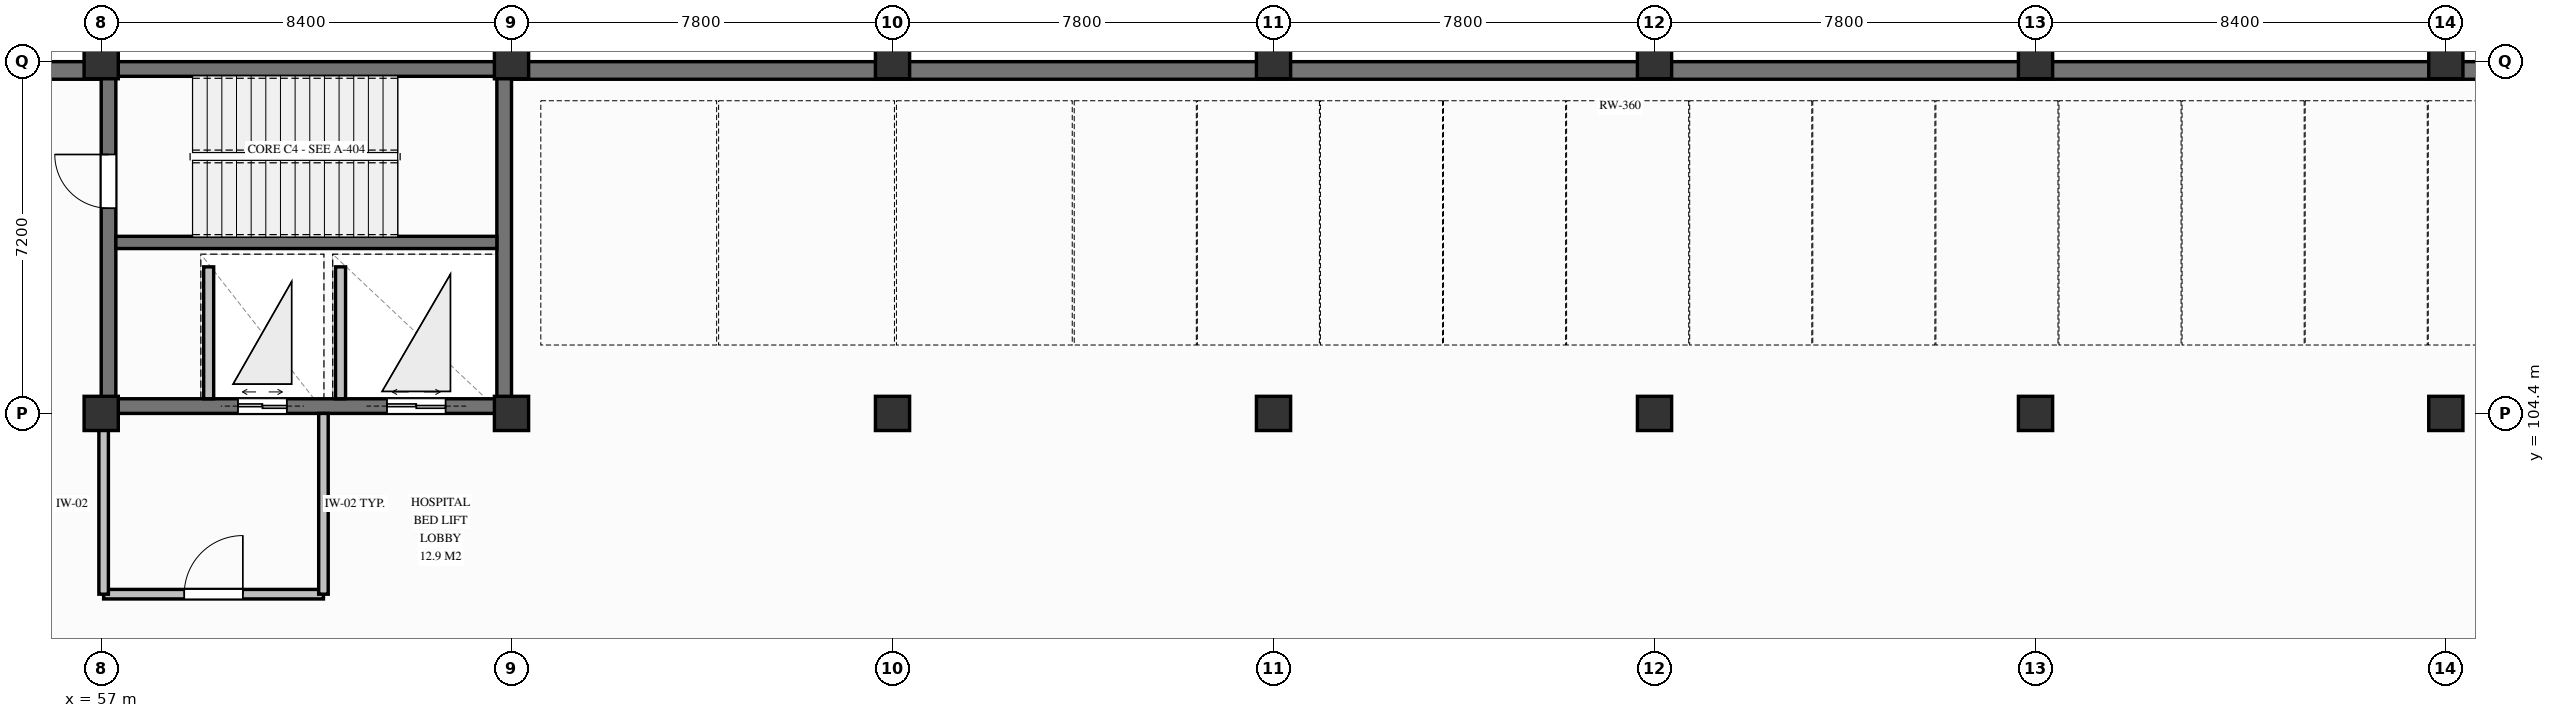
"""IFC4 building model, lengths in metres.
Left out: names, types, materials, properties, quantities, classifications, styles, units other than length and angle.
Written with IfcOpenShell. Run it as: python <this file> out.ifc"""

import sys

from ifc_helpers import new_model, si_unit, direction, frame, frame_2d, origin, origin_2d, place, context, subcontext, project, spatial, rectangle, extrude, element, fill, save


model = new_model("IFC4")
c1 = context("Model", 3, precision=1e-05, world=origin(), true_north=direction((0.0, 1.0)))
c2 = subcontext(c1, "Body", "Model", "MODEL_VIEW")
j1 = project(units=[si_unit("LENGTHUNIT", "METRE"), si_unit("PLANEANGLEUNIT", "RADIAN")], contexts=[c1])
p1 = place(None, origin())
s1 = spatial("IfcSite", under=j1, at=p1, CompositionType="ELEMENT")
p2 = place(p1, origin())
s2 = spatial("IfcBuilding", under=s1, at=p2, CompositionType="ELEMENT")
p3 = place(p2, frame((0.0, 0.0, -4.5)))
s3 = spatial("IfcBuildingStorey", under=s2, at=p3, CompositionType="ELEMENT", Elevation=-4.5)
p4 = place(p3, frame((57.0, 111.45, 0.0), z_axis=(0.0, 0.0, 1.0), x_axis=(1.0, 0.0, 0.0)))
e1 = element("IfcWall", 1, at=p4, inside=s3, PredefinedType="SHEAR", context=c2, shape_type="SweptSolid", body=[
    extrude(rectangle(XDim=8.4, YDim=0.3, at=frame_2d((4.2, 0.0))), origin(), (0.0, 0.0, 1.0), 4.5),
])
p5 = place(p3, frame((57.0, 104.55, 0.0), z_axis=(0.0, 0.0, 1.0), x_axis=(1.0, 0.0, 0.0)))
e2 = element("IfcWall", 2, at=p5, inside=s3, PredefinedType="SHEAR", context=c2, shape_type="SweptSolid", body=[
    extrude(rectangle(XDim=8.4, YDim=0.3, at=frame_2d((4.2, 0.0))), origin(), (0.0, 0.0, 1.0), 4.5),
])
p6 = place(p5, frame((2.8, 0.0, 0.0)))
e3 = element("IfcOpeningElement", 3, at=p6, cuts=e2, PredefinedType="OPENING", context=c2, shape_type="SweptSolid", body=[
    extrude(rectangle(XDim=1.0, YDim=2.1, at=frame_2d((0.5, 1.05))), frame((0.0, 0.16, 0.0), z_axis=(0.0, -1.0, 0.0), x_axis=(1.0, 0.0, 0.0)), (0.0, 0.0, 1.0), 0.32),
])
p7 = place(p5, frame((5.85, 0.0, 0.0)))
e4 = element("IfcOpeningElement", 4, at=p7, cuts=e2, PredefinedType="OPENING", context=c2, shape_type="SweptSolid", body=[
    extrude(rectangle(XDim=1.2, YDim=2.15, at=frame_2d((0.6, 1.075))), frame((0.0, 0.16, 0.0), z_axis=(0.0, -1.0, 0.0), x_axis=(1.0, 0.0, 0.0)), (0.0, 0.0, 1.0), 0.32),
])
p8 = place(p3, frame((57.15, 104.4, 0.0), z_axis=(0.0, 0.0, 1.0), x_axis=(0.0, 1.0, 0.0)))
e5 = element("IfcWall", 5, at=p8, inside=s3, PredefinedType="SHEAR", context=c2, shape_type="SweptSolid", body=[
    extrude(rectangle(XDim=7.2, YDim=0.3, at=frame_2d((3.6, 0.0))), origin(), (0.0, 0.0, 1.0), 4.5),
])
p9 = place(p8, frame((4.2, 0.0, 0.0)))
e6 = element("IfcOpeningElement", 6, at=p9, cuts=e5, PredefinedType="OPENING", context=c2, shape_type="SweptSolid", body=[
    extrude(rectangle(XDim=1.1, YDim=2.15, at=frame_2d((0.55, 1.075))), frame((0.0, 0.16, 0.0), z_axis=(0.0, -1.0, 0.0), x_axis=(1.0, 0.0, 0.0)), (0.0, 0.0, 1.0), 0.32),
])
p10 = place(p3, frame((65.25, 104.4, 0.0), z_axis=(0.0, 0.0, 1.0), x_axis=(0.0, 1.0, 0.0)))
e7 = element("IfcWall", 7, at=p10, inside=s3, PredefinedType="SHEAR", context=c2, shape_type="SweptSolid", body=[
    extrude(rectangle(XDim=7.2, YDim=0.3, at=frame_2d((3.6, 0.0))), origin(), (0.0, 0.0, 1.0), 4.5),
])
p11 = place(p3, frame((57.3, 107.9, 0.0), z_axis=(0.0, 0.0, 1.0), x_axis=(1.0, 0.0, 0.0)))
e8 = element("IfcWall", 8, at=p11, inside=s3, PredefinedType="SHEAR", context=c2, shape_type="SweptSolid", body=[
    extrude(rectangle(XDim=7.8, YDim=0.25, at=frame_2d((3.9, 0.0))), origin(), (0.0, 0.0, 1.0), 4.5),
])
p12 = place(p3, frame((49.2, 111.42, 0.0), z_axis=(0.0, 0.0, 1.0), x_axis=(1.0, 0.0, 0.0)))
e9 = element("IfcWall", 9, at=p12, inside=s3, PredefinedType="USERDEFINED", context=c2, shape_type="SweptSolid", body=[
    extrude(rectangle(XDim=7.8, YDim=0.36, at=frame_2d((3.9, 0.0))), origin(), (0.0, 0.0, 1.0), 4.5),
])
p13 = place(p3, frame((65.4, 111.42, 0.0), z_axis=(0.0, 0.0, 1.0), x_axis=(1.0, 0.0, 0.0)))
e10 = element("IfcWall", 10, at=p13, inside=s3, PredefinedType="USERDEFINED", context=c2, shape_type="SweptSolid", body=[
    extrude(rectangle(XDim=48.0, YDim=0.36, at=frame_2d((24.0, 0.0))), origin(), (0.0, 0.0, 1.0), 4.5),
])
for number, where, z_axis, x_axis in (
    (11, (57.0, 104.4, 0.0), (0.0, 0.0, 1.0), (1.0, 0.0, 0.0)),
    (12, (57.0, 111.6, 0.0), (0.0, 0.0, 1.0), (1.0, 0.0, 0.0)),
    (13, (65.4, 104.4, 0.0), (0.0, 0.0, 1.0), (1.0, 0.0, 0.0)),
    (14, (65.4, 111.6, 0.0), (0.0, 0.0, 1.0), (1.0, 0.0, 0.0)),
    (15, (73.2, 104.4, 0.0), (0.0, 0.0, 1.0), (1.0, 0.0, 0.0)),
    (16, (73.2, 111.6, 0.0), (0.0, 0.0, 1.0), (1.0, 0.0, 0.0)),
    (17, (81.0, 104.4, 0.0), (0.0, 0.0, 1.0), (1.0, 0.0, 0.0)),
    (18, (81.0, 111.6, 0.0), (0.0, 0.0, 1.0), (1.0, 0.0, 0.0)),
    (19, (88.8, 104.4, 0.0), (0.0, 0.0, 1.0), (1.0, 0.0, 0.0)),
    (20, (88.8, 111.6, 0.0), (0.0, 0.0, 1.0), (1.0, 0.0, 0.0)),
    (21, (96.6, 104.4, 0.0), (0.0, 0.0, 1.0), (1.0, 0.0, 0.0)),
    (22, (96.6, 111.6, 0.0), (0.0, 0.0, 1.0), (1.0, 0.0, 0.0)),
    (23, (105.0, 104.4, 0.0), (0.0, 0.0, 1.0), (1.0, 0.0, 0.0)),
    (24, (105.0, 111.6, 0.0), (0.0, 0.0, 1.0), (1.0, 0.0, 0.0)),
):
    element("IfcColumn", number, at=place(p3, frame(where, z_axis=z_axis, x_axis=x_axis)), inside=s3, PredefinedType="COLUMN", context=c2, shape_type="SweptSolid", body=[
        extrude(rectangle(XDim=0.7, YDim=0.7, at=origin_2d()), origin(), (0.0, 0.0, 1.0), 4.5),
    ])
for number, where, z_axis, x_axis in (
    (25, (59.2, 104.7, 0.0), (0.0, 0.0, 1.0), (0.0, 1.0, 0.0)),
    (26, (61.9, 104.7, 0.0), (0.0, 0.0, 1.0), (0.0, 1.0, 0.0)),
):
    element("IfcWall", number, at=place(p3, frame(where, z_axis=z_axis, x_axis=x_axis)), inside=s3, PredefinedType="PARTITIONING", context=c2, shape_type="SweptSolid", body=[
        extrude(rectangle(XDim=2.7, YDim=0.205, at=frame_2d((1.35, 0.0))), origin(), (0.0, 0.0, 1.0), 3.313),
    ])
p14 = place(p3, frame((57.05, 100.7, 0.0), z_axis=(0.0, 0.0, 1.0), x_axis=(1.0, 0.0, 0.0)))
e27 = element("IfcWall", 27, at=p14, inside=s3, PredefinedType="PARTITIONING", context=c2, shape_type="SweptSolid", body=[
    extrude(rectangle(XDim=4.5, YDim=0.195, at=frame_2d((2.25, 0.0))), origin(), (0.0, 0.0, 1.0), 3.613),
])
p15 = place(p14, frame((1.65, 0.0, 0.0)))
e28 = element("IfcOpeningElement", 28, at=p15, cuts=e27, PredefinedType="OPENING", context=c2, shape_type="SweptSolid", body=[
    extrude(rectangle(XDim=1.2, YDim=2.15, at=frame_2d((0.6, 1.075))), frame((0.0, 0.107, 0.0), z_axis=(0.0, -1.0, 0.0), x_axis=(1.0, 0.0, 0.0)), (0.0, 0.0, 1.0), 0.215),
])
for number, where, z_axis, x_axis in (
    (29, (61.55, 100.7, 0.0), (0.0, 0.0, 1.0), (0.0, 1.0, 0.0)),
    (30, (57.05, 100.7, 0.0), (0.0, 0.0, 1.0), (0.0, 1.0, 0.0)),
):
    element("IfcWall", number, at=place(p3, frame(where, z_axis=z_axis, x_axis=x_axis)), inside=s3, PredefinedType="PARTITIONING", context=c2, shape_type="SweptSolid", body=[
        extrude(rectangle(XDim=3.7, YDim=0.195, at=frame_2d((1.85, 0.0))), origin(), (0.0, 0.0, 1.0), 3.313),
    ])
p16 = place(p9, origin())
e31 = element("IfcDoor", 31, at=p16, inside=s3, OperationType="SINGLE_SWING_RIGHT", PredefinedType="DOOR", context=c2, shape_type="SweptSolid", body=[
    extrude(rectangle(XDim=1.1, YDim=2.15, at=frame_2d((0.55, 1.075))), frame((0.0, 0.025, 0.0), z_axis=(0.0, -1.0, 0.0), x_axis=(1.0, 0.0, 0.0)), (0.0, 0.0, 1.0), 0.05),
])
fill(e6, e31)
p17 = place(p6, origin())
e32 = element("IfcDoor", 32, at=p17, inside=s3, OperationType="DOUBLE_DOOR_SLIDING", PredefinedType="DOOR", context=c2, shape_type="SweptSolid", body=[
    extrude(rectangle(XDim=1.0, YDim=2.1, at=frame_2d((0.5, 1.05))), frame((0.0, 0.025, 0.0), z_axis=(0.0, -1.0, 0.0), x_axis=(1.0, 0.0, 0.0)), (0.0, 0.0, 1.0), 0.05),
])
fill(e3, e32)
p18 = place(p7, origin())
e33 = element("IfcDoor", 33, at=p18, inside=s3, OperationType="DOUBLE_DOOR_SLIDING", PredefinedType="DOOR", context=c2, shape_type="SweptSolid", body=[
    extrude(rectangle(XDim=1.2, YDim=2.15, at=frame_2d((0.6, 1.075))), frame((0.0, 0.025, 0.0), z_axis=(0.0, -1.0, 0.0), x_axis=(1.0, 0.0, 0.0)), (0.0, 0.0, 1.0), 0.05),
])
fill(e4, e33)
p19 = place(p15, origin())
e34 = element("IfcDoor", 34, at=p19, inside=s3, OperationType="SINGLE_SWING_RIGHT", PredefinedType="DOOR", context=c2, shape_type="SweptSolid", body=[
    extrude(rectangle(XDim=1.2, YDim=2.15, at=frame_2d((0.6, 1.075))), frame((0.0, 0.025, 0.0), z_axis=(0.0, -1.0, 0.0), x_axis=(1.0, 0.0, 0.0)), (0.0, 0.0, 1.0), 0.05),
])
fill(e28, e34)
save(model, sys.argv[1])
